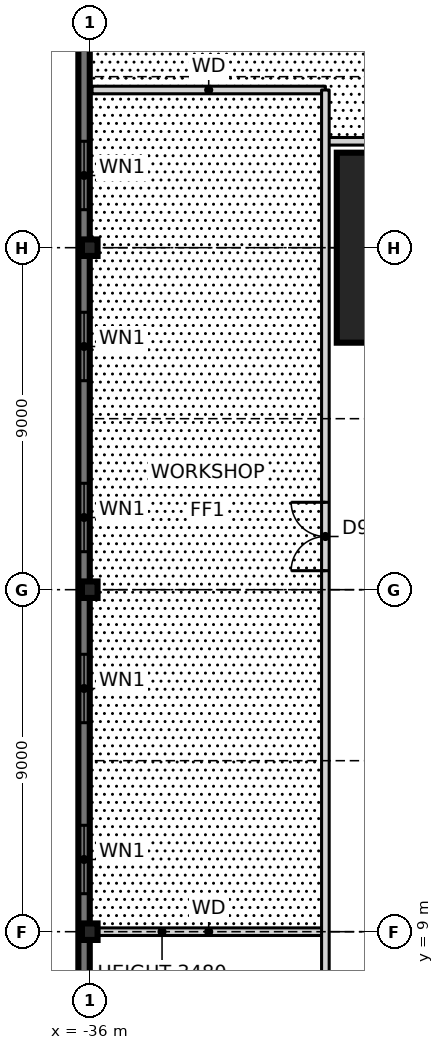
"""IFC4 building model, lengths in metres.
Left out: names, types, materials, properties, quantities, classifications, styles, units other than length and angle.
Written with IfcOpenShell. Run it as: python <this file> out.ifc"""

import sys

from ifc_helpers import new_model, si_unit, direction, frame, frame_2d, origin, origin_2d, place, context, subcontext, project, spatial, rectangle, i_section, extrude, element, fill, save


model = new_model("IFC4")
c1 = context("Model", 3, precision=1e-05, world=origin(), true_north=direction((0.0, 1.0)))
c2 = subcontext(c1, "Body", "Model", "MODEL_VIEW")
j1 = project(units=[si_unit("LENGTHUNIT", "METRE"), si_unit("PLANEANGLEUNIT", "RADIAN")], contexts=[c1])
p1 = place(None, origin())
s1 = spatial("IfcSite", under=j1, at=p1, CompositionType="ELEMENT")
p2 = place(p1, origin())
s2 = spatial("IfcBuilding", under=s1, at=p2, CompositionType="ELEMENT")
p3 = place(p2, frame((0.0, 0.0, 10.5)))
s3 = spatial("IfcBuildingStorey", under=s2, at=p3, CompositionType="ELEMENT", Elevation=10.5)
p4 = place(p3, frame((-27.0, 27.0, 0.0), z_axis=(0.0, 0.0, 1.0), x_axis=(1.0, 0.0, 0.0)))
e1 = element("IfcColumn", 1, at=p4, inside=s3, PredefinedType="COLUMN", context=c2, shape_type="SweptSolid", body=[
    extrude(rectangle(XDim=5.0, YDim=5.0, at=origin_2d()), origin(), (0.0, 0.0, 1.0), 4.5),
    extrude(i_section(OverallWidth=0.478, OverallDepth=0.599, WebThickness=0.1, FlangeThickness=0.14, at=origin_2d()), origin(), (0.0, 0.0, 1.0), 4.5),
])
for number, where, z_axis, x_axis in (
    (2, (-36.0, 9.0, 0.0), (0.0, 0.0, 1.0), (1.0, 0.0, 0.0)),
    (3, (-36.0, 18.0, 0.0), (0.0, 0.0, 1.0), (1.0, 0.0, 0.0)),
    (4, (-36.0, 27.0, 0.0), (0.0, 0.0, 1.0), (1.0, 0.0, 0.0)),
):
    element("IfcColumn", number, at=place(p3, frame(where, z_axis=z_axis, x_axis=x_axis)), inside=s3, PredefinedType="COLUMN", context=c2, shape_type="SweptSolid", body=[
        extrude(i_section(OverallWidth=0.411, OverallDepth=0.434, WebThickness=0.036, FlangeThickness=0.057, at=origin_2d()), origin(), (0.0, 0.0, 1.0), 4.5),
    ])
p5 = place(p3, frame((-36.15, 36.3, -0.25), z_axis=(0.0, 0.0, 1.0), x_axis=(0.0, -1.0, 0.0)))
e5 = element("IfcWall", 5, at=p5, inside=s3, PredefinedType="SOLIDWALL", context=c2, shape_type="SweptSolid", body=[
    extrude(rectangle(XDim=72.6, YDim=0.3, at=frame_2d((36.3, 0.0))), origin(), (0.0, 0.0, 1.0), 4.75),
])
p6 = place(p5, frame((2.0, 0.0, 1.15)))
e6 = element("IfcOpeningElement", 6, at=p6, cuts=e5, PredefinedType="OPENING", context=c2, shape_type="SweptSolid", body=[
    extrude(rectangle(XDim=1.8, YDim=2.4, at=frame_2d((0.9, 1.2))), frame((0.0, 0.16, 0.0), z_axis=(0.0, -1.0, 0.0), x_axis=(1.0, 0.0, 0.0)), (0.0, 0.0, 1.0), 0.32),
])
p7 = place(p5, frame((6.5, 0.0, 1.15)))
e7 = element("IfcOpeningElement", 7, at=p7, cuts=e5, PredefinedType="OPENING", context=c2, shape_type="SweptSolid", body=[
    extrude(rectangle(XDim=1.8, YDim=2.4, at=frame_2d((0.9, 1.2))), frame((0.0, 0.16, 0.0), z_axis=(0.0, -1.0, 0.0), x_axis=(1.0, 0.0, 0.0)), (0.0, 0.0, 1.0), 0.32),
])
p8 = place(p5, frame((11.0, 0.0, 1.15)))
e8 = element("IfcOpeningElement", 8, at=p8, cuts=e5, PredefinedType="OPENING", context=c2, shape_type="SweptSolid", body=[
    extrude(rectangle(XDim=1.8, YDim=2.4, at=frame_2d((0.9, 1.2))), frame((0.0, 0.16, 0.0), z_axis=(0.0, -1.0, 0.0), x_axis=(1.0, 0.0, 0.0)), (0.0, 0.0, 1.0), 0.32),
])
p9 = place(p5, frame((15.5, 0.0, 1.15)))
e9 = element("IfcOpeningElement", 9, at=p9, cuts=e5, PredefinedType="OPENING", context=c2, shape_type="SweptSolid", body=[
    extrude(rectangle(XDim=1.8, YDim=2.4, at=frame_2d((0.9, 1.2))), frame((0.0, 0.16, 0.0), z_axis=(0.0, -1.0, 0.0), x_axis=(1.0, 0.0, 0.0)), (0.0, 0.0, 1.0), 0.32),
])
p10 = place(p5, frame((20.0, 0.0, 1.15)))
e10 = element("IfcOpeningElement", 10, at=p10, cuts=e5, PredefinedType="OPENING", context=c2, shape_type="SweptSolid", body=[
    extrude(rectangle(XDim=1.8, YDim=2.4, at=frame_2d((0.9, 1.2))), frame((0.0, 0.16, 0.0), z_axis=(0.0, -1.0, 0.0), x_axis=(1.0, 0.0, 0.0)), (0.0, 0.0, 1.0), 0.32),
])
p11 = place(p5, frame((24.5, 0.0, 1.15)))
e11 = element("IfcOpeningElement", 11, at=p11, cuts=e5, PredefinedType="OPENING", context=c2, shape_type="SweptSolid", body=[
    extrude(rectangle(XDim=1.8, YDim=2.4, at=frame_2d((0.9, 1.2))), frame((0.0, 0.16, 0.0), z_axis=(0.0, -1.0, 0.0), x_axis=(1.0, 0.0, 0.0)), (0.0, 0.0, 1.0), 0.32),
])
p12 = place(p5, frame((29.0, 0.0, 1.15)))
e12 = element("IfcOpeningElement", 12, at=p12, cuts=e5, PredefinedType="OPENING", context=c2, shape_type="SweptSolid", body=[
    extrude(rectangle(XDim=1.8, YDim=2.4, at=frame_2d((0.9, 1.2))), frame((0.0, 0.16, 0.0), z_axis=(0.0, -1.0, 0.0), x_axis=(1.0, 0.0, 0.0)), (0.0, 0.0, 1.0), 0.32),
])
p13 = place(p5, frame((42.5, 0.0, 1.15)))
e13 = element("IfcOpeningElement", 13, at=p13, cuts=e5, PredefinedType="OPENING", context=c2, shape_type="SweptSolid", body=[
    extrude(rectangle(XDim=1.8, YDim=2.4, at=frame_2d((0.9, 1.2))), frame((0.0, 0.16, 0.0), z_axis=(0.0, -1.0, 0.0), x_axis=(1.0, 0.0, 0.0)), (0.0, 0.0, 1.0), 0.32),
])
p14 = place(p5, frame((47.0, 0.0, 1.15)))
e14 = element("IfcOpeningElement", 14, at=p14, cuts=e5, PredefinedType="OPENING", context=c2, shape_type="SweptSolid", body=[
    extrude(rectangle(XDim=1.8, YDim=2.4, at=frame_2d((0.9, 1.2))), frame((0.0, 0.16, 0.0), z_axis=(0.0, -1.0, 0.0), x_axis=(1.0, 0.0, 0.0)), (0.0, 0.0, 1.0), 0.32),
])
p15 = place(p5, frame((51.5, 0.0, 1.15)))
e15 = element("IfcOpeningElement", 15, at=p15, cuts=e5, PredefinedType="OPENING", context=c2, shape_type="SweptSolid", body=[
    extrude(rectangle(XDim=1.8, YDim=2.4, at=frame_2d((0.9, 1.2))), frame((0.0, 0.16, 0.0), z_axis=(0.0, -1.0, 0.0), x_axis=(1.0, 0.0, 0.0)), (0.0, 0.0, 1.0), 0.32),
])
p16 = place(p5, frame((56.0, 0.0, 1.15)))
e16 = element("IfcOpeningElement", 16, at=p16, cuts=e5, PredefinedType="OPENING", context=c2, shape_type="SweptSolid", body=[
    extrude(rectangle(XDim=1.8, YDim=2.4, at=frame_2d((0.9, 1.2))), frame((0.0, 0.16, 0.0), z_axis=(0.0, -1.0, 0.0), x_axis=(1.0, 0.0, 0.0)), (0.0, 0.0, 1.0), 0.32),
])
p17 = place(p5, frame((60.5, 0.0, 1.15)))
e17 = element("IfcOpeningElement", 17, at=p17, cuts=e5, PredefinedType="OPENING", context=c2, shape_type="SweptSolid", body=[
    extrude(rectangle(XDim=1.8, YDim=2.4, at=frame_2d((0.9, 1.2))), frame((0.0, 0.16, 0.0), z_axis=(0.0, -1.0, 0.0), x_axis=(1.0, 0.0, 0.0)), (0.0, 0.0, 1.0), 0.32),
])
p18 = place(p5, frame((65.0, 0.0, 1.15)))
e18 = element("IfcOpeningElement", 18, at=p18, cuts=e5, PredefinedType="OPENING", context=c2, shape_type="SweptSolid", body=[
    extrude(rectangle(XDim=1.8, YDim=2.4, at=frame_2d((0.9, 1.2))), frame((0.0, 0.16, 0.0), z_axis=(0.0, -1.0, 0.0), x_axis=(1.0, 0.0, 0.0)), (0.0, 0.0, 1.0), 0.32),
])
p19 = place(p5, frame((69.5, 0.0, 1.15)))
e19 = element("IfcOpeningElement", 19, at=p19, cuts=e5, PredefinedType="OPENING", context=c2, shape_type="SweptSolid", body=[
    extrude(rectangle(XDim=1.8, YDim=2.4, at=frame_2d((0.9, 1.2))), frame((0.0, 0.16, 0.0), z_axis=(0.0, -1.0, 0.0), x_axis=(1.0, 0.0, 0.0)), (0.0, 0.0, 1.0), 0.32),
])
p20 = place(p3, frame((-35.94, 9.0, 0.0), z_axis=(0.0, 0.0, 1.0), x_axis=(1.0, 0.0, 0.0)))
e20 = element("IfcWall", 20, at=p20, inside=s3, PredefinedType="SOLIDWALL", context=c2, shape_type="SweptSolid", body=[
    extrude(rectangle(XDim=6.14, YDim=0.2, at=frame_2d((3.07, 0.0))), origin(), (0.0, 0.0, 1.0), 3.48),
])
p21 = place(p3, frame((-29.8, 29.8, 0.0), z_axis=(0.0, 0.0, 1.0), x_axis=(1.0, 0.0, 0.0)))
e21 = element("IfcWall", 21, at=p21, inside=s3, PredefinedType="SOLIDWALL", context=c2, shape_type="SweptSolid", body=[
    extrude(rectangle(XDim=59.6, YDim=0.2, at=frame_2d((29.8, 0.0))), origin(), (0.0, 0.0, 1.0), 4.25),
])
p22 = place(p21, frame((9.5, 0.0, 0.0)))
e22 = element("IfcOpeningElement", 22, at=p22, cuts=e21, PredefinedType="OPENING", context=c2, shape_type="SweptSolid", body=[
    extrude(rectangle(XDim=1.8, YDim=2.1, at=frame_2d((0.9, 1.05))), frame((0.0, 0.11, 0.0), z_axis=(0.0, -1.0, 0.0), x_axis=(1.0, 0.0, 0.0)), (0.0, 0.0, 1.0), 0.22),
])
p23 = place(p21, frame((23.55, 0.0, 0.0)))
e23 = element("IfcOpeningElement", 23, at=p23, cuts=e21, PredefinedType="OPENING", context=c2, shape_type="SweptSolid", body=[
    extrude(rectangle(XDim=1.8, YDim=2.1, at=frame_2d((0.9, 1.05))), frame((0.0, 0.11, 0.0), z_axis=(0.0, -1.0, 0.0), x_axis=(1.0, 0.0, 0.0)), (0.0, 0.0, 1.0), 0.22),
])
p24 = place(p21, frame((28.9, 0.0, 0.0)))
e24 = element("IfcOpeningElement", 24, at=p24, cuts=e21, PredefinedType="OPENING", context=c2, shape_type="SweptSolid", body=[
    extrude(rectangle(XDim=1.8, YDim=2.1, at=frame_2d((0.9, 1.05))), frame((0.0, 0.11, 0.0), z_axis=(0.0, -1.0, 0.0), x_axis=(1.0, 0.0, 0.0)), (0.0, 0.0, 1.0), 0.22),
])
p25 = place(p21, frame((33.2, 0.0, 0.0)))
e25 = element("IfcOpeningElement", 25, at=p25, cuts=e21, PredefinedType="OPENING", context=c2, shape_type="SweptSolid", body=[
    extrude(rectangle(XDim=1.8, YDim=2.1, at=frame_2d((0.9, 1.05))), frame((0.0, 0.11, 0.0), z_axis=(0.0, -1.0, 0.0), x_axis=(1.0, 0.0, 0.0)), (0.0, 0.0, 1.0), 0.22),
])
p26 = place(p21, frame((42.95, 0.0, 0.0)))
e26 = element("IfcOpeningElement", 26, at=p26, cuts=e21, PredefinedType="OPENING", context=c2, shape_type="SweptSolid", body=[
    extrude(rectangle(XDim=1.8, YDim=2.1, at=frame_2d((0.9, 1.05))), frame((0.0, 0.11, 0.0), z_axis=(0.0, -1.0, 0.0), x_axis=(1.0, 0.0, 0.0)), (0.0, 0.0, 1.0), 0.22),
])
p27 = place(p21, frame((50.2, 0.0, 0.0)))
e27 = element("IfcOpeningElement", 27, at=p27, cuts=e21, PredefinedType="OPENING", context=c2, shape_type="SweptSolid", body=[
    extrude(rectangle(XDim=1.8, YDim=2.1, at=frame_2d((0.9, 1.05))), frame((0.0, 0.11, 0.0), z_axis=(0.0, -1.0, 0.0), x_axis=(1.0, 0.0, 0.0)), (0.0, 0.0, 1.0), 0.22),
])
p28 = place(p3, frame((-35.94, 31.15, 0.0), z_axis=(0.0, 0.0, 1.0), x_axis=(1.0, 0.0, 0.0)))
e28 = element("IfcWall", 28, at=p28, inside=s3, PredefinedType="SOLIDWALL", context=c2, shape_type="SweptSolid", body=[
    extrude(rectangle(XDim=6.14, YDim=0.2, at=frame_2d((3.07, 0.0))), origin(), (0.0, 0.0, 1.0), 4.25),
])
p29 = place(p3, frame((-29.8, -31.4, 0.0), z_axis=(0.0, 0.0, 1.0), x_axis=(0.0, 1.0, 0.0)))
e29 = element("IfcWall", 29, at=p29, inside=s3, PredefinedType="SOLIDWALL", context=c2, shape_type="SweptSolid", body=[
    extrude(rectangle(XDim=62.55, YDim=0.2, at=frame_2d((31.275, 0.0))), origin(), (0.0, 0.0, 1.0), 4.25),
])
p30 = place(p29, frame((8.675, 0.0, 0.0)))
e30 = element("IfcOpeningElement", 30, at=p30, cuts=e29, PredefinedType="OPENING", context=c2, shape_type="SweptSolid", body=[
    extrude(rectangle(XDim=1.8, YDim=2.1, at=frame_2d((0.9, 1.05))), frame((0.0, 0.11, 0.0), z_axis=(0.0, -1.0, 0.0), x_axis=(1.0, 0.0, 0.0)), (0.0, 0.0, 1.0), 0.22),
])
p31 = place(p29, frame((25.175, 0.0, 0.0)))
e31 = element("IfcOpeningElement", 31, at=p31, cuts=e29, PredefinedType="OPENING", context=c2, shape_type="SweptSolid", body=[
    extrude(rectangle(XDim=1.8, YDim=2.1, at=frame_2d((0.9, 1.05))), frame((0.0, 0.11, 0.0), z_axis=(0.0, -1.0, 0.0), x_axis=(1.0, 0.0, 0.0)), (0.0, 0.0, 1.0), 0.22),
])
p32 = place(p29, frame((30.5, 0.0, 0.0)))
e32 = element("IfcOpeningElement", 32, at=p32, cuts=e29, PredefinedType="OPENING", context=c2, shape_type="SweptSolid", body=[
    extrude(rectangle(XDim=1.8, YDim=2.1, at=frame_2d((0.9, 1.05))), frame((0.0, 0.11, 0.0), z_axis=(0.0, -1.0, 0.0), x_axis=(1.0, 0.0, 0.0)), (0.0, 0.0, 1.0), 0.22),
])
p33 = place(p29, frame((35.85, 0.0, 0.0)))
e33 = element("IfcOpeningElement", 33, at=p33, cuts=e29, PredefinedType="OPENING", context=c2, shape_type="SweptSolid", body=[
    extrude(rectangle(XDim=1.8, YDim=2.1, at=frame_2d((0.9, 1.05))), frame((0.0, 0.11, 0.0), z_axis=(0.0, -1.0, 0.0), x_axis=(1.0, 0.0, 0.0)), (0.0, 0.0, 1.0), 0.22),
])
p34 = place(p29, frame((49.9, 0.0, 0.0)))
e34 = element("IfcOpeningElement", 34, at=p34, cuts=e29, PredefinedType="OPENING", context=c2, shape_type="SweptSolid", body=[
    extrude(rectangle(XDim=1.8, YDim=2.1, at=frame_2d((0.9, 1.05))), frame((0.0, 0.11, 0.0), z_axis=(0.0, -1.0, 0.0), x_axis=(1.0, 0.0, 0.0)), (0.0, 0.0, 1.0), 0.22),
])
p35 = place(p7, origin())
e35 = element("IfcWindow", 35, at=p35, inside=s3, PartitioningType="SINGLE_PANEL", PredefinedType="WINDOW", context=c2, shape_type="SweptSolid", body=[
    extrude(rectangle(XDim=1.8, YDim=2.4, at=frame_2d((0.9, 1.2))), frame((0.0, 0.03, 0.0), z_axis=(0.0, -1.0, 0.0), x_axis=(1.0, 0.0, 0.0)), (0.0, 0.0, 1.0), 0.06),
])
fill(e7, e35)
p36 = place(p8, origin())
e36 = element("IfcWindow", 36, at=p36, inside=s3, PartitioningType="SINGLE_PANEL", PredefinedType="WINDOW", context=c2, shape_type="SweptSolid", body=[
    extrude(rectangle(XDim=1.8, YDim=2.4, at=frame_2d((0.9, 1.2))), frame((0.0, 0.03, 0.0), z_axis=(0.0, -1.0, 0.0), x_axis=(1.0, 0.0, 0.0)), (0.0, 0.0, 1.0), 0.06),
])
fill(e8, e36)
p37 = place(p9, origin())
e37 = element("IfcWindow", 37, at=p37, inside=s3, PartitioningType="SINGLE_PANEL", PredefinedType="WINDOW", context=c2, shape_type="SweptSolid", body=[
    extrude(rectangle(XDim=1.8, YDim=2.4, at=frame_2d((0.9, 1.2))), frame((0.0, 0.03, 0.0), z_axis=(0.0, -1.0, 0.0), x_axis=(1.0, 0.0, 0.0)), (0.0, 0.0, 1.0), 0.06),
])
fill(e9, e37)
p38 = place(p10, origin())
e38 = element("IfcWindow", 38, at=p38, inside=s3, PartitioningType="SINGLE_PANEL", PredefinedType="WINDOW", context=c2, shape_type="SweptSolid", body=[
    extrude(rectangle(XDim=1.8, YDim=2.4, at=frame_2d((0.9, 1.2))), frame((0.0, 0.03, 0.0), z_axis=(0.0, -1.0, 0.0), x_axis=(1.0, 0.0, 0.0)), (0.0, 0.0, 1.0), 0.06),
])
fill(e10, e38)
p39 = place(p11, origin())
e39 = element("IfcWindow", 39, at=p39, inside=s3, PartitioningType="SINGLE_PANEL", PredefinedType="WINDOW", context=c2, shape_type="SweptSolid", body=[
    extrude(rectangle(XDim=1.8, YDim=2.4, at=frame_2d((0.9, 1.2))), frame((0.0, 0.03, 0.0), z_axis=(0.0, -1.0, 0.0), x_axis=(1.0, 0.0, 0.0)), (0.0, 0.0, 1.0), 0.06),
])
fill(e11, e39)
p40 = place(p34, origin())
e40 = element("IfcDoor", 40, at=p40, inside=s3, OperationType="DOUBLE_DOOR_SINGLE_SWING", PredefinedType="DOOR", context=c2, shape_type="SweptSolid", body=[
    extrude(rectangle(XDim=1.8, YDim=2.1, at=frame_2d((0.9, 1.05))), frame((0.0, 0.025, 0.0), z_axis=(0.0, -1.0, 0.0), x_axis=(1.0, 0.0, 0.0)), (0.0, 0.0, 1.0), 0.05),
])
fill(e34, e40)
save(model, sys.argv[1])
